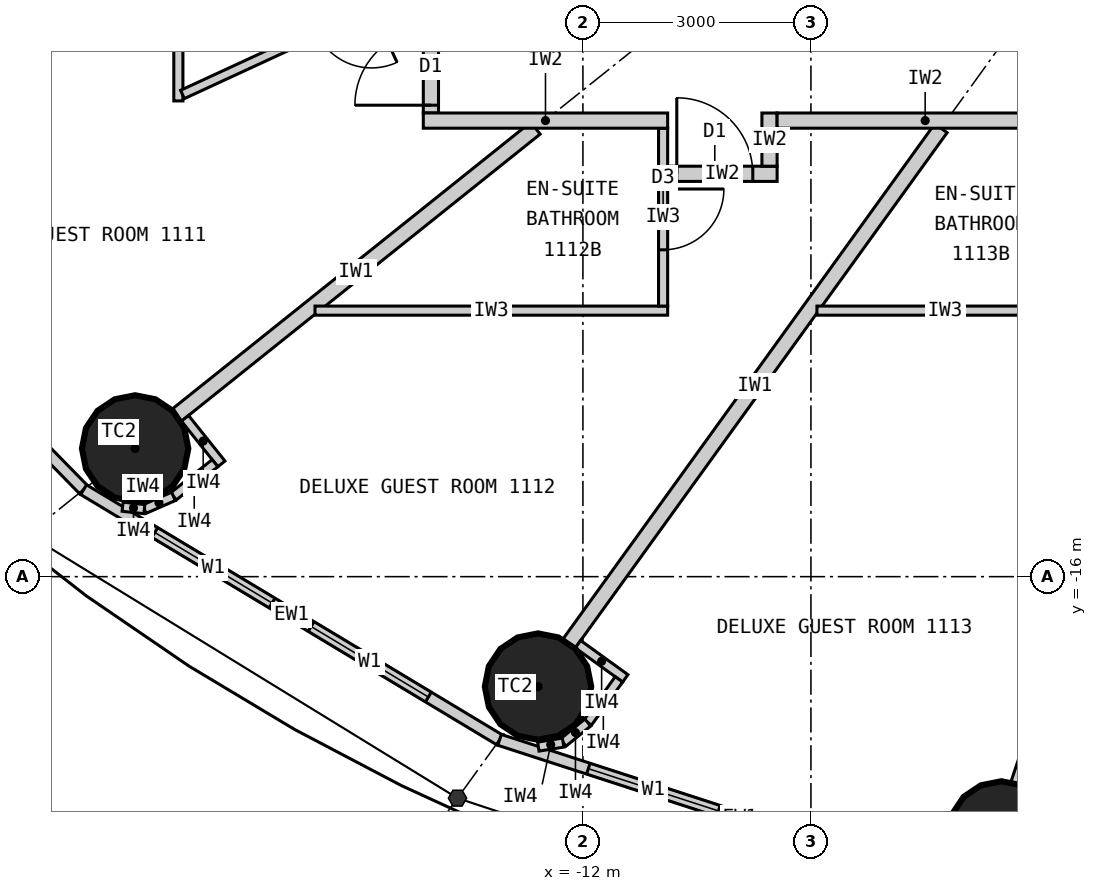
"""IFC4 building model, lengths in metres.
Left out: names, types, materials, properties, quantities, classifications, styles, units other than length and angle.
Written with IfcOpenShell. Run it as: python <this file> out.ifc"""

import sys

from ifc_helpers import new_model, si_unit, direction, frame, frame_2d, origin, origin_2d, place, context, subcontext, project, spatial, rectangle, circle, extrude, element, fill, save


model = new_model("IFC4")
c1 = context("Model", 3, precision=1e-05, world=origin(), true_north=direction((0.0, 1.0)))
c2 = subcontext(c1, "Body", "Model", "MODEL_VIEW")
j1 = project(units=[si_unit("LENGTHUNIT", "METRE"), si_unit("PLANEANGLEUNIT", "RADIAN")], contexts=[c1])
p1 = place(None, origin())
s1 = spatial("IfcSite", under=j1, at=p1, CompositionType="ELEMENT")
p2 = place(p1, origin())
s2 = spatial("IfcBuilding", under=s1, at=p2, CompositionType="ELEMENT")
p3 = place(p2, frame((0.0, 0.0, 50.7)))
s3 = spatial("IfcBuildingStorey", under=s2, at=p3, CompositionType="ELEMENT", Elevation=50.7)
for number, where, z_axis, x_axis in (
    (1, (-17.892, -14.313, 0.0), (0.0, 0.0, 1.0), (1.0, 0.0, 0.0)),
    (2, (-12.591, -17.447, 0.0), (0.0, 0.0, 1.0), (1.0, 0.0, 0.0)),
    (3, (-6.495, -19.391, 0.0), (0.0, 0.0, 1.0), (1.0, 0.0, 0.0)),
):
    element("IfcColumn", number, at=place(p3, frame(where, z_axis=z_axis, x_axis=x_axis)), inside=s3, PredefinedType="COLUMN", context=c2, shape_type="SweptSolid", body=[
        extrude(circle(Radius=0.7, at=origin_2d()), origin(), (0.0, 0.0, 1.0), 3.3),
    ])
p4 = place(p3, frame((-22.803, -10.532, 0.0), z_axis=(0.0, 0.0, 1.0), x_axis=(0.699602905915, -0.714531856557, 0.0)))
e4 = element("IfcWall", 4, at=p4, inside=s3, PredefinedType="ELEMENTEDWALL", context=c2, shape_type="SweptSolid", body=[
    extrude(rectangle(XDim=6.051, YDim=0.15, at=frame_2d((3.025, 0.0))), origin(), (0.0, 0.0, 1.0), 3.12),
])
p5 = place(p4, frame((0.926, 0.0, 0.9)))
e5 = element("IfcOpeningElement", 5, at=p5, cuts=e4, PredefinedType="OPENING", context=c2, shape_type="SweptSolid", body=[
    extrude(rectangle(XDim=1.8, YDim=1.9, at=frame_2d((0.9, 0.95))), frame((0.0, 0.085, 0.0), z_axis=(0.0, -1.0, 0.0), x_axis=(1.0, 0.0, 0.0)), (0.0, 0.0, 1.0), 0.17),
])
p6 = place(p4, frame((3.325, 0.0, 0.9)))
e6 = element("IfcOpeningElement", 6, at=p6, cuts=e4, PredefinedType="OPENING", context=c2, shape_type="SweptSolid", body=[
    extrude(rectangle(XDim=1.8, YDim=1.9, at=frame_2d((0.9, 0.95))), frame((0.0, 0.085, 0.0), z_axis=(0.0, -1.0, 0.0), x_axis=(1.0, 0.0, 0.0)), (0.0, 0.0, 1.0), 0.17),
])
p7 = place(p3, frame((-18.57, -14.856, 0.0), z_axis=(0.0, 0.0, 1.0), x_axis=(0.856983180864, -0.515344377787, 0.0)))
e7 = element("IfcWall", 7, at=p7, inside=s3, PredefinedType="ELEMENTEDWALL", context=c2, shape_type="SweptSolid", body=[
    extrude(rectangle(XDim=6.386, YDim=0.15, at=frame_2d((3.193, 0.0))), origin(), (0.0, 0.0, 1.0), 3.12),
])
p8 = place(p7, frame((1.093, 0.0, 0.9)))
e8 = element("IfcOpeningElement", 8, at=p8, cuts=e7, PredefinedType="OPENING", context=c2, shape_type="SweptSolid", body=[
    extrude(rectangle(XDim=1.8, YDim=1.9, at=frame_2d((0.9, 0.95))), frame((0.0, 0.085, 0.0), z_axis=(0.0, -1.0, 0.0), x_axis=(1.0, 0.0, 0.0)), (0.0, 0.0, 1.0), 0.17),
])
p9 = place(p7, frame((3.493, 0.0, 0.9)))
e9 = element("IfcOpeningElement", 9, at=p9, cuts=e7, PredefinedType="OPENING", context=c2, shape_type="SweptSolid", body=[
    extrude(rectangle(XDim=1.8, YDim=1.9, at=frame_2d((0.9, 0.95))), frame((0.0, 0.085, 0.0), z_axis=(0.0, -1.0, 0.0), x_axis=(1.0, 0.0, 0.0)), (0.0, 0.0, 1.0), 0.17),
])
p10 = place(p3, frame((-13.096, -18.147, 0.0), z_axis=(0.0, 0.0, 1.0), x_axis=(0.951137534625, -0.308767534285, 0.0)))
e10 = element("IfcWall", 10, at=p10, inside=s3, PredefinedType="ELEMENTEDWALL", context=c2, shape_type="SweptSolid", body=[
    extrude(rectangle(XDim=6.655, YDim=0.15, at=frame_2d((3.328, 0.0))), origin(), (0.0, 0.0, 1.0), 3.12),
])
p11 = place(p10, frame((1.228, 0.0, 0.9)))
e11 = element("IfcOpeningElement", 11, at=p11, cuts=e10, PredefinedType="OPENING", context=c2, shape_type="SweptSolid", body=[
    extrude(rectangle(XDim=1.8, YDim=1.9, at=frame_2d((0.9, 0.95))), frame((0.0, 0.085, 0.0), z_axis=(0.0, -1.0, 0.0), x_axis=(1.0, 0.0, 0.0)), (0.0, 0.0, 1.0), 0.17),
])
p12 = place(p10, frame((3.628, 0.0, 0.9)))
e12 = element("IfcOpeningElement", 12, at=p12, cuts=e10, PredefinedType="OPENING", context=c2, shape_type="SweptSolid", body=[
    extrude(rectangle(XDim=1.8, YDim=1.9, at=frame_2d((0.9, 0.95))), frame((0.0, 0.085, 0.0), z_axis=(0.0, -1.0, 0.0), x_axis=(1.0, 0.0, 0.0)), (0.0, 0.0, 1.0), 0.17),
])
p13 = place(p3, frame((-14.1, -6.512, 0.0), z_axis=(0.0, 0.0, 1.0), x_axis=(-0.907832871056, -0.419332181247, 0.0)))
e13 = element("IfcWall", 13, at=p13, inside=s3, PredefinedType="PARTITIONING", context=c2, shape_type="SweptSolid", body=[
    extrude(rectangle(XDim=8.023, YDim=0.2, at=frame_2d((4.011, 0.0))), origin(), (0.0, 0.0, 1.0), 2.32),
])
p14 = place(p3, frame((-12.625, -10.1, 0.0), z_axis=(0.0, 0.0, 1.0), x_axis=(-0.780892451574, -0.624665493744, 0.0)))
e14 = element("IfcWall", 14, at=p14, inside=s3, PredefinedType="PARTITIONING", context=c2, shape_type="SweptSolid", body=[
    extrude(rectangle(XDim=6.045, YDim=0.2, at=frame_2d((3.022, 0.0))), origin(), (0.0, 0.0, 1.0), 2.32),
])
p15 = place(p3, frame((-7.289, -10.1, 0.0), z_axis=(0.0, 0.0, 1.0), x_axis=(-0.585198353053, -0.810890182197, 0.0)))
e15 = element("IfcWall", 15, at=p15, inside=s3, PredefinedType="PARTITIONING", context=c2, shape_type="SweptSolid", body=[
    extrude(rectangle(XDim=8.36, YDim=0.2, at=frame_2d((4.18, 0.0))), origin(), (0.0, 0.0, 1.0), 2.32),
])
p16 = place(p3, frame((-3.383, -10.1, 0.0), z_axis=(0.0, 0.0, 1.0), x_axis=(-0.31759592231, -0.948226149256, 0.0)))
e16 = element("IfcWall", 16, at=p16, inside=s3, PredefinedType="PARTITIONING", context=c2, shape_type="SweptSolid", body=[
    extrude(rectangle(XDim=9.098, YDim=0.2, at=frame_2d((4.549, 0.0))), origin(), (0.0, 0.0, 1.0), 2.32),
])
p17 = place(p3, frame((-17.323, -8.101, 0.0), z_axis=(0.0, 0.0, 1.0), x_axis=(0.0, -1.0, 0.0)))
e17 = element("IfcWall", 17, at=p17, inside=s3, PredefinedType="PARTITIONING", context=c2, shape_type="SweptSolid", body=[
    extrude(rectangle(XDim=1.64, YDim=0.12, at=frame_2d((0.82, 0.0))), origin(), (0.0, 0.0, 1.0), 3.12),
])
p18 = place(p3, frame((-14.1, -8.193, 0.0), z_axis=(0.0, 0.0, 1.0), x_axis=(-0.907836493557, -0.419324338628, 0.0)))
e18 = element("IfcWall", 18, at=p18, inside=s3, PredefinedType="PARTITIONING", context=c2, shape_type="SweptSolid", body=[
    extrude(rectangle(XDim=3.49, YDim=0.12, at=frame_2d((1.745, 0.0))), origin(), (0.0, 0.0, 1.0), 3.12),
])
p19 = place(p18, frame((0.75, 0.0, 0.0)))
e19 = element("IfcOpeningElement", 19, at=p19, cuts=e18, PredefinedType="OPENING", context=c2, shape_type="SweptSolid", body=[
    extrude(rectangle(XDim=0.8, YDim=2.1, at=frame_2d((0.4, 1.05))), frame((0.0, 0.07, 0.0), z_axis=(0.0, -1.0, 0.0), x_axis=(1.0, 0.0, 0.0)), (0.0, 0.0, 1.0), 0.14),
])
p20 = place(p3, frame((-15.525, -12.5, 0.0), z_axis=(0.0, 0.0, 1.0), x_axis=(1.0, 0.0, 0.0)))
e20 = element("IfcWall", 20, at=p20, inside=s3, PredefinedType="PARTITIONING", context=c2, shape_type="SweptSolid", body=[
    extrude(rectangle(XDim=4.64, YDim=0.12, at=frame_2d((2.32, 0.0))), origin(), (0.0, 0.0, 1.0), 3.12),
])
p21 = place(p3, frame((-10.945, -10.1, 0.0), z_axis=(0.0, 0.0, 1.0), x_axis=(0.0, -1.0, 0.0)))
e21 = element("IfcWall", 21, at=p21, inside=s3, PredefinedType="PARTITIONING", context=c2, shape_type="SweptSolid", body=[
    extrude(rectangle(XDim=2.34, YDim=0.12, at=frame_2d((1.17, 0.0))), origin(), (0.0, 0.0, 1.0), 3.12),
])
p22 = place(p21, frame((0.8, 0.0, 0.0)))
e22 = element("IfcOpeningElement", 22, at=p22, cuts=e21, PredefinedType="OPENING", context=c2, shape_type="SweptSolid", body=[
    extrude(rectangle(XDim=0.8, YDim=2.1, at=frame_2d((0.4, 1.05))), frame((0.0, 0.07, 0.0), z_axis=(0.0, -1.0, 0.0), x_axis=(1.0, 0.0, 0.0)), (0.0, 0.0, 1.0), 0.14),
])
p23 = place(p3, frame((-8.921, -12.5, 0.0), z_axis=(0.0, 0.0, 1.0), x_axis=(1.0, 0.0, 0.0)))
e23 = element("IfcWall", 23, at=p23, inside=s3, PredefinedType="PARTITIONING", context=c2, shape_type="SweptSolid", body=[
    extrude(rectangle(XDim=3.372, YDim=0.12, at=frame_2d((1.686, 0.0))), origin(), (0.0, 0.0, 1.0), 3.12),
])
p24 = place(p3, frame((-9.445, -10.7, 0.0), z_axis=(0.0, 0.0, 1.0), x_axis=(-1.0, 0.0, 0.0)))
e24 = element("IfcWall", 24, at=p24, inside=s3, PredefinedType="PARTITIONING", context=c2, shape_type="SweptSolid", body=[
    extrude(rectangle(XDim=1.44, YDim=0.2, at=frame_2d((0.72, 0.0))), origin(), (0.0, 0.0, 1.0), 3.12),
])
p25 = place(p24, frame((0.32, 0.0, 0.0)))
e25 = element("IfcOpeningElement", 25, at=p25, cuts=e24, PredefinedType="OPENING", context=c2, shape_type="SweptSolid", body=[
    extrude(rectangle(XDim=1.0, YDim=2.2, at=frame_2d((0.5, 1.1))), frame((0.0, 0.11, 0.0), z_axis=(0.0, -1.0, 0.0), x_axis=(1.0, 0.0, 0.0)), (0.0, 0.0, 1.0), 0.22),
])
p26 = place(p3, frame((-9.545, -9.9, 0.0), z_axis=(0.0, 0.0, 1.0), x_axis=(0.0, -1.0, 0.0)))
e26 = element("IfcWall", 26, at=p26, inside=s3, PredefinedType="PARTITIONING", context=c2, shape_type="SweptSolid", body=[
    extrude(rectangle(XDim=0.7, YDim=0.2, at=frame_2d((0.35, 0.0))), origin(), (0.0, 0.0, 1.0), 3.12),
])
p27 = place(p3, frame((-14.0, -4.772, 0.0), z_axis=(0.0, 0.0, 1.0), x_axis=(0.0, -1.0, 0.0)))
e27 = element("IfcWall", 27, at=p27, inside=s3, PredefinedType="PARTITIONING", context=c2, shape_type="SweptSolid", body=[
    extrude(rectangle(XDim=5.127, YDim=0.2, at=frame_2d((2.564, 0.0))), origin(), (0.0, 0.0, 1.0), 3.12),
])
p28 = place(p27, frame((4.025, 0.0, 0.0)))
e28 = element("IfcOpeningElement", 28, at=p28, cuts=e27, PredefinedType="OPENING", context=c2, shape_type="SweptSolid", body=[
    extrude(rectangle(XDim=1.0, YDim=2.2, at=frame_2d((0.5, 1.1))), frame((0.0, 0.11, 0.0), z_axis=(0.0, -1.0, 0.0), x_axis=(1.0, 0.0, 0.0)), (0.0, 0.0, 1.0), 0.22),
])
p29 = place(p3, frame((-5.549, -10.0, 0.0), z_axis=(0.0, 0.0, 1.0), x_axis=(-1.0, 0.0, 0.0)))
e29 = element("IfcWall", 29, at=p29, inside=s3, PredefinedType="PARTITIONING", context=c2, shape_type="SweptSolid", body=[
    extrude(rectangle(XDim=3.896, YDim=0.2, at=frame_2d((1.948, 0.0))), origin(), (0.0, 0.0, 1.0), 3.12),
])
p30 = place(p3, frame((-10.885, -10.0, 0.0), z_axis=(0.0, 0.0, 1.0), x_axis=(-1.0, 0.0, 0.0)))
e30 = element("IfcWall", 30, at=p30, inside=s3, PredefinedType="PARTITIONING", context=c2, shape_type="SweptSolid", body=[
    extrude(rectangle(XDim=3.215, YDim=0.2, at=frame_2d((1.607, 0.0))), origin(), (0.0, 0.0, 1.0), 3.12),
])
p31 = place(p3, frame((-17.236, -13.917, 0.0), z_axis=(0.0, 0.0, 1.0), x_axis=(0.624695047554, -0.780868809443, 0.0)))
e31 = element("IfcWall", 31, at=p31, inside=s3, PredefinedType="PARTITIONING", context=c2, shape_type="SweptSolid", body=[
    extrude(rectangle(XDim=0.768, YDim=0.12, at=frame_2d((0.384, 0.0))), origin(), (0.0, 0.0, 1.0), 3.12),
])
p32 = place(p3, frame((-16.841, -14.507, 0.0), z_axis=(0.0, 0.0, 1.0), x_axis=(-0.780902834923, -0.62465251333, 0.0)))
e32 = element("IfcWall", 32, at=p32, inside=s3, PredefinedType="PARTITIONING", context=c2, shape_type="SweptSolid", body=[
    extrude(rectangle(XDim=0.7, YDim=0.12, at=frame_2d((0.35, 0.0))), origin(), (0.0, 0.0, 1.0), 3.12),
])
p33 = place(p3, frame((-17.387, -14.944, 0.0), z_axis=(0.0, 0.0, 1.0), x_axis=(-0.916036698064, -0.401094462441, 0.0)))
e33 = element("IfcWall", 33, at=p33, inside=s3, PredefinedType="PARTITIONING", context=c2, shape_type="SweptSolid", body=[
    extrude(rectangle(XDim=0.418, YDim=0.12, at=frame_2d((0.209, 0.0))), origin(), (0.0, 0.0, 1.0), 3.12),
])
p34 = place(p3, frame((-17.77, -15.112, 0.0), z_axis=(0.0, 0.0, 1.0), x_axis=(-0.993904401174, 0.110245368731, 0.0)))
e34 = element("IfcWall", 34, at=p34, inside=s3, PredefinedType="PARTITIONING", context=c2, shape_type="SweptSolid", body=[
    extrude(rectangle(XDim=0.288, YDim=0.12, at=frame_2d((0.144, 0.0))), origin(), (0.0, 0.0, 1.0), 3.12),
])
p35 = place(p3, frame((-12.065, -16.889, 0.0), z_axis=(0.0, 0.0, 1.0), x_axis=(0.810821798253, -0.585293098778, 0.0)))
e35 = element("IfcWall", 35, at=p35, inside=s3, PredefinedType="PARTITIONING", context=c2, shape_type="SweptSolid", body=[
    extrude(rectangle(XDim=0.768, YDim=0.12, at=frame_2d((0.384, 0.0))), origin(), (0.0, 0.0, 1.0), 3.12),
])
p36 = place(p3, frame((-11.526, -17.351, 0.0), z_axis=(0.0, 0.0, 1.0), x_axis=(-0.585223113993, -0.810872312296, 0.0)))
e36 = element("IfcWall", 36, at=p36, inside=s3, PredefinedType="PARTITIONING", context=c2, shape_type="SweptSolid", body=[
    extrude(rectangle(XDim=0.7, YDim=0.12, at=frame_2d((0.35, 0.0))), origin(), (0.0, 0.0, 1.0), 3.12),
])
p37 = place(p3, frame((-11.936, -17.919, 0.0), z_axis=(0.0, 0.0, 1.0), x_axis=(-0.775023088441, -0.631932917629, 0.0)))
e37 = element("IfcWall", 37, at=p37, inside=s3, PredefinedType="PARTITIONING", context=c2, shape_type="SweptSolid", body=[
    extrude(rectangle(XDim=0.418, YDim=0.12, at=frame_2d((0.209, 0.0))), origin(), (0.0, 0.0, 1.0), 3.12),
])
p38 = place(p3, frame((-12.26, -18.183, 0.0), z_axis=(0.0, 0.0, 1.0), x_axis=(-0.987218661664, -0.159371622511, 0.0)))
e38 = element("IfcWall", 38, at=p38, inside=s3, PredefinedType="PARTITIONING", context=c2, shape_type="SweptSolid", body=[
    extrude(rectangle(XDim=0.331, YDim=0.12, at=frame_2d((0.166, 0.0))), origin(), (0.0, 0.0, 1.0), 3.12),
])
p39 = place(p8, origin())
e39 = element("IfcWindow", 39, at=p39, inside=s3, PartitioningType="SINGLE_PANEL", PredefinedType="WINDOW", context=c2, shape_type="SweptSolid", body=[
    extrude(rectangle(XDim=1.8, YDim=1.9, at=frame_2d((0.9, 0.95))), frame((0.0, 0.03, 0.0), z_axis=(0.0, -1.0, 0.0), x_axis=(1.0, 0.0, 0.0)), (0.0, 0.0, 1.0), 0.06),
])
fill(e8, e39)
p40 = place(p9, origin())
e40 = element("IfcWindow", 40, at=p40, inside=s3, PartitioningType="SINGLE_PANEL", PredefinedType="WINDOW", context=c2, shape_type="SweptSolid", body=[
    extrude(rectangle(XDim=1.8, YDim=1.9, at=frame_2d((0.9, 0.95))), frame((0.0, 0.03, 0.0), z_axis=(0.0, -1.0, 0.0), x_axis=(1.0, 0.0, 0.0)), (0.0, 0.0, 1.0), 0.06),
])
fill(e9, e40)
p41 = place(p11, origin())
e41 = element("IfcWindow", 41, at=p41, inside=s3, PartitioningType="SINGLE_PANEL", PredefinedType="WINDOW", context=c2, shape_type="SweptSolid", body=[
    extrude(rectangle(XDim=1.8, YDim=1.9, at=frame_2d((0.9, 0.95))), frame((0.0, 0.03, 0.0), z_axis=(0.0, -1.0, 0.0), x_axis=(1.0, 0.0, 0.0)), (0.0, 0.0, 1.0), 0.06),
])
fill(e11, e41)
p42 = place(p28, origin())
e42 = element("IfcDoor", 42, at=p42, inside=s3, OperationType="SINGLE_SWING_RIGHT", PredefinedType="DOOR", context=c2, shape_type="SweptSolid", body=[
    extrude(rectangle(XDim=1.0, YDim=2.2, at=frame_2d((0.5, 1.1))), frame((0.0, 0.025, 0.0), z_axis=(0.0, -1.0, 0.0), x_axis=(1.0, 0.0, 0.0)), (0.0, 0.0, 1.0), 0.05),
])
fill(e28, e42)
p43 = place(p22, origin())
e43 = element("IfcDoor", 43, at=p43, inside=s3, OperationType="SINGLE_SWING_LEFT", PredefinedType="DOOR", context=c2, shape_type="SweptSolid", body=[
    extrude(rectangle(XDim=0.8, YDim=2.1, at=frame_2d((0.4, 1.05))), frame((0.0, 0.025, 0.0), z_axis=(0.0, -1.0, 0.0), x_axis=(1.0, 0.0, 0.0)), (0.0, 0.0, 1.0), 0.05),
])
fill(e22, e43)
p44 = place(p25, origin())
e44 = element("IfcDoor", 44, at=p44, inside=s3, OperationType="SINGLE_SWING_RIGHT", PredefinedType="DOOR", context=c2, shape_type="SweptSolid", body=[
    extrude(rectangle(XDim=1.0, YDim=2.2, at=frame_2d((0.5, 1.1))), frame((0.0, 0.025, 0.0), z_axis=(0.0, -1.0, 0.0), x_axis=(1.0, 0.0, 0.0)), (0.0, 0.0, 1.0), 0.05),
])
fill(e25, e44)
save(model, sys.argv[1])
